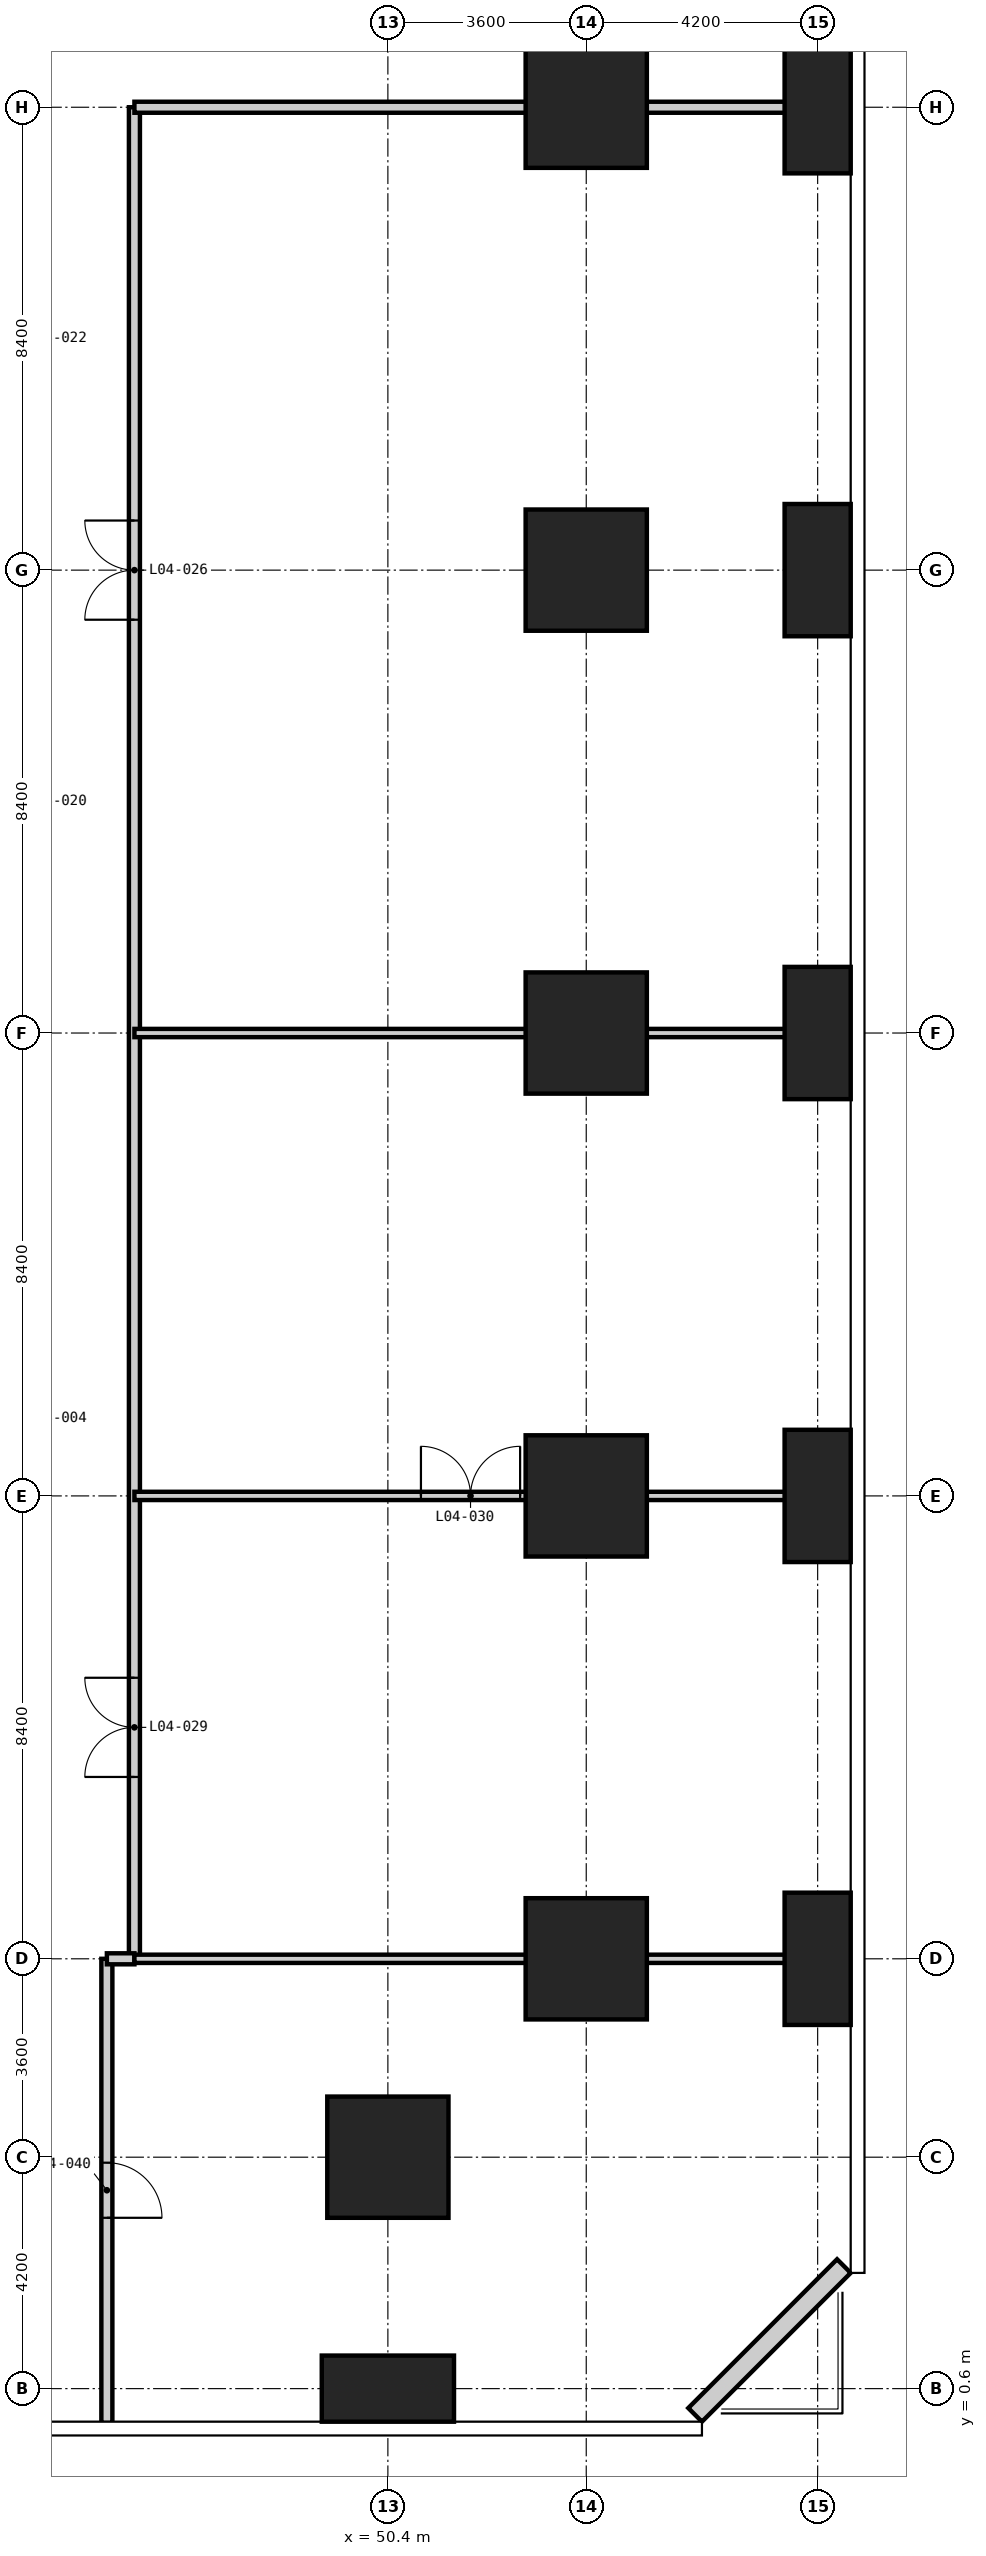
"""IFC4 building model, lengths in metres.
Left out: names, types, materials, properties, quantities, classifications, styles, units other than length and angle.
Written with IfcOpenShell. Run it as: python <this file> out.ifc"""

import sys

from ifc_helpers import new_model, si_unit, direction, frame, frame_2d, origin, origin_2d, place, context, subcontext, project, spatial, rectangle, extrude, element, fill, save


model = new_model("IFC4")
c1 = context("Model", 3, precision=1e-05, world=origin(), true_north=direction((0.0, 1.0)))
c2 = subcontext(c1, "Body", "Model", "MODEL_VIEW")
j1 = project(units=[si_unit("LENGTHUNIT", "METRE"), si_unit("PLANEANGLEUNIT", "RADIAN")], contexts=[c1])
p1 = place(None, origin())
s1 = spatial("IfcSite", under=j1, at=p1, CompositionType="ELEMENT")
p2 = place(p1, origin())
s2 = spatial("IfcBuilding", under=s1, at=p2, CompositionType="ELEMENT")
p3 = place(p2, frame((0.0, 0.0, 22.0)))
s3 = spatial("IfcBuildingStorey", under=s2, at=p3, CompositionType="ELEMENT", Elevation=22.0)
p4 = place(p3, frame((50.4, 0.6, -0.35), z_axis=(0.0, 0.0, 1.0), x_axis=(1.0, 0.0, 0.0)))
e1 = element("IfcColumn", 1, at=p4, inside=s3, PredefinedType="COLUMN", context=c2, shape_type="SweptSolid", body=[
    extrude(rectangle(XDim=2.4, YDim=1.2, at=origin_2d()), origin(), (0.0, 0.0, 1.0), 5.0),
])
for number, where, z_axis, x_axis in (
    (2, (50.4, 4.8, -0.35), (0.0, 0.0, 1.0), (1.0, 0.0, 0.0)),
    (3, (54.0, 8.4, -0.35), (0.0, 0.0, 1.0), (1.0, 0.0, 0.0)),
    (4, (54.0, 16.8, -0.35), (0.0, 0.0, 1.0), (1.0, 0.0, 0.0)),
    (5, (54.0, 25.2, -0.35), (0.0, 0.0, 1.0), (1.0, 0.0, 0.0)),
    (6, (54.0, 33.6, -0.35), (0.0, 0.0, 1.0), (1.0, 0.0, 0.0)),
    (7, (54.0, 42.0, -0.35), (0.0, 0.0, 1.0), (1.0, 0.0, 0.0)),
):
    element("IfcColumn", number, at=place(p3, frame(where, z_axis=z_axis, x_axis=x_axis)), inside=s3, PredefinedType="COLUMN", context=c2, shape_type="SweptSolid", body=[
        extrude(rectangle(XDim=2.2, YDim=2.2, at=origin_2d()), origin(), (0.0, 0.0, 1.0), 5.0),
    ])
for number, where, z_axis, x_axis in (
    (8, (58.2, 8.4, -0.35), (0.0, 0.0, 1.0), (1.0, 0.0, 0.0)),
    (9, (58.2, 16.8, -0.35), (0.0, 0.0, 1.0), (1.0, 0.0, 0.0)),
    (10, (58.2, 25.2, -0.35), (0.0, 0.0, 1.0), (1.0, 0.0, 0.0)),
    (11, (58.2, 33.6, -0.35), (0.0, 0.0, 1.0), (1.0, 0.0, 0.0)),
    (12, (58.2, 42.0, -0.35), (0.0, 0.0, 1.0), (1.0, 0.0, 0.0)),
):
    element("IfcColumn", number, at=place(p3, frame(where, z_axis=z_axis, x_axis=x_axis)), inside=s3, PredefinedType="COLUMN", context=c2, shape_type="SweptSolid", body=[
        extrude(rectangle(XDim=1.2, YDim=2.4, at=origin_2d()), origin(), (0.0, 0.0, 1.0), 5.0),
    ])
p5 = place(p3, frame((55.976, 0.124, 0.0), z_axis=(0.0, 0.0, 1.0), x_axis=(0.707106781187, 0.707106781187, 0.0)))
e13 = element("IfcWall", 13, at=p5, inside=s3, PredefinedType="SOLIDWALL", context=c2, shape_type="SweptSolid", body=[
    extrude(rectangle(XDim=3.818, YDim=0.35, at=frame_2d((1.909, 0.0))), origin(), (0.0, 0.0, 1.0), 4.65),
])
p6 = place(p3, frame((45.3, -0.023, 0.0), z_axis=(0.0, 0.0, 1.0), x_axis=(0.0, 1.0, 0.0)))
e14 = element("IfcWall", 14, at=p6, inside=s3, PredefinedType="PARTITIONING", context=c2, shape_type="SweptSolid", body=[
    extrude(rectangle(XDim=8.423, YDim=0.2, at=frame_2d((4.211, 0.0))), origin(), (0.0, 0.0, 1.0), 4.65),
])
p7 = place(p6, frame((3.723, 0.0, 0.0)))
e15 = element("IfcOpeningElement", 15, at=p7, cuts=e14, PredefinedType="OPENING", context=c2, shape_type="SweptSolid", body=[
    extrude(rectangle(XDim=1.0, YDim=2.1, at=frame_2d((0.5, 1.05))), frame((0.0, 0.11, 0.0), z_axis=(0.0, -1.0, 0.0), x_axis=(1.0, 0.0, 0.0)), (0.0, 0.0, 1.0), 0.22),
])
p8 = place(p3, frame((45.8, 8.4, 0.0), z_axis=(0.0, 0.0, 1.0), x_axis=(0.0, 1.0, 0.0)))
e16 = element("IfcWall", 16, at=p8, inside=s3, PredefinedType="PARTITIONING", context=c2, shape_type="SweptSolid", body=[
    extrude(rectangle(XDim=33.6, YDim=0.2, at=frame_2d((16.8, 0.0))), origin(), (0.0, 0.0, 1.0), 4.65),
])
p9 = place(p8, frame((24.3, 0.0, 0.0)))
e17 = element("IfcOpeningElement", 17, at=p9, cuts=e16, PredefinedType="OPENING", context=c2, shape_type="SweptSolid", body=[
    extrude(rectangle(XDim=1.8, YDim=2.4, at=frame_2d((0.9, 1.2))), frame((0.0, 0.11, 0.0), z_axis=(0.0, -1.0, 0.0), x_axis=(1.0, 0.0, 0.0)), (0.0, 0.0, 1.0), 0.22),
])
p10 = place(p8, frame((3.3, 0.0, 0.0)))
e18 = element("IfcOpeningElement", 18, at=p10, cuts=e16, PredefinedType="OPENING", context=c2, shape_type="SweptSolid", body=[
    extrude(rectangle(XDim=1.8, YDim=2.4, at=frame_2d((0.9, 1.2))), frame((0.0, 0.11, 0.0), z_axis=(0.0, -1.0, 0.0), x_axis=(1.0, 0.0, 0.0)), (0.0, 0.0, 1.0), 0.22),
])
p11 = place(p3, frame((45.3, 8.4, 0.0), z_axis=(0.0, 0.0, 1.0), x_axis=(1.0, 0.0, 0.0)))
e19 = element("IfcWall", 19, at=p11, inside=s3, PredefinedType="PARTITIONING", context=c2, shape_type="SweptSolid", body=[
    extrude(rectangle(XDim=0.5, YDim=0.2, at=frame_2d((0.25, 0.0))), origin(), (0.0, 0.0, 1.0), 4.65),
])
p12 = place(p3, frame((45.8, 42.0, 0.0), z_axis=(0.0, 0.0, 1.0), x_axis=(1.0, 0.0, 0.0)))
e20 = element("IfcWall", 20, at=p12, inside=s3, PredefinedType="PARTITIONING", context=c2, shape_type="SweptSolid", body=[
    extrude(rectangle(XDim=13.023, YDim=0.2, at=frame_2d((6.511, 0.0))), origin(), (0.0, 0.0, 1.0), 4.65),
])
p13 = place(p3, frame((45.8, 8.4, 0.0), z_axis=(0.0, 0.0, 1.0), x_axis=(1.0, 0.0, 0.0)))
e21 = element("IfcWall", 21, at=p13, inside=s3, PredefinedType="PARTITIONING", context=c2, shape_type="SweptSolid", body=[
    extrude(rectangle(XDim=13.023, YDim=0.15, at=frame_2d((6.511, 0.0))), origin(), (0.0, 0.0, 1.0), 4.65),
])
p14 = place(p3, frame((45.8, 16.8, 0.0), z_axis=(0.0, 0.0, 1.0), x_axis=(1.0, 0.0, 0.0)))
e22 = element("IfcWall", 22, at=p14, inside=s3, PredefinedType="PARTITIONING", context=c2, shape_type="SweptSolid", body=[
    extrude(rectangle(XDim=13.023, YDim=0.15, at=frame_2d((6.511, 0.0))), origin(), (0.0, 0.0, 1.0), 4.65),
])
p15 = place(p14, frame((5.2, 0.0, 0.0)))
e23 = element("IfcOpeningElement", 23, at=p15, cuts=e22, PredefinedType="OPENING", context=c2, shape_type="SweptSolid", body=[
    extrude(rectangle(XDim=1.8, YDim=2.4, at=frame_2d((0.9, 1.2))), frame((0.0, 0.085, 0.0), z_axis=(0.0, -1.0, 0.0), x_axis=(1.0, 0.0, 0.0)), (0.0, 0.0, 1.0), 0.17),
])
p16 = place(p3, frame((45.8, 25.2, 0.0), z_axis=(0.0, 0.0, 1.0), x_axis=(1.0, 0.0, 0.0)))
e24 = element("IfcWall", 24, at=p16, inside=s3, PredefinedType="PARTITIONING", context=c2, shape_type="SweptSolid", body=[
    extrude(rectangle(XDim=13.023, YDim=0.15, at=frame_2d((6.511, 0.0))), origin(), (0.0, 0.0, 1.0), 4.65),
])
p17 = place(p9, origin())
e25 = element("IfcDoor", 25, at=p17, inside=s3, OperationType="DOUBLE_DOOR_DOUBLE_SWING", PredefinedType="DOOR", context=c2, shape_type="SweptSolid", body=[
    extrude(rectangle(XDim=1.8, YDim=2.4, at=frame_2d((0.9, 1.2))), frame((0.0, 0.025, 0.0), z_axis=(0.0, -1.0, 0.0), x_axis=(1.0, 0.0, 0.0)), (0.0, 0.0, 1.0), 0.05),
])
fill(e17, e25)
p18 = place(p10, origin())
e26 = element("IfcDoor", 26, at=p18, inside=s3, OperationType="DOUBLE_DOOR_DOUBLE_SWING", PredefinedType="DOOR", context=c2, shape_type="SweptSolid", body=[
    extrude(rectangle(XDim=1.8, YDim=2.4, at=frame_2d((0.9, 1.2))), frame((0.0, 0.025, 0.0), z_axis=(0.0, -1.0, 0.0), x_axis=(1.0, 0.0, 0.0)), (0.0, 0.0, 1.0), 0.05),
])
fill(e18, e26)
p19 = place(p15, origin())
e27 = element("IfcDoor", 27, at=p19, inside=s3, OperationType="DOUBLE_DOOR_DOUBLE_SWING", PredefinedType="DOOR", context=c2, shape_type="SweptSolid", body=[
    extrude(rectangle(XDim=1.8, YDim=2.4, at=frame_2d((0.9, 1.2))), frame((0.0, 0.025, 0.0), z_axis=(0.0, -1.0, 0.0), x_axis=(1.0, 0.0, 0.0)), (0.0, 0.0, 1.0), 0.05),
])
fill(e23, e27)
p20 = place(p7, frame((1.0, 0.0, 0.0), z_axis=(0.0, 0.0, 1.0), x_axis=(-1.0, 0.0, 0.0)))
e28 = element("IfcDoor", 28, at=p20, inside=s3, OperationType="SINGLE_SWING_RIGHT", PredefinedType="DOOR", context=c2, shape_type="SweptSolid", body=[
    extrude(rectangle(XDim=1.0, YDim=2.1, at=frame_2d((0.5, 1.05))), frame((0.0, 0.025, 0.0), z_axis=(0.0, -1.0, 0.0), x_axis=(1.0, 0.0, 0.0)), (0.0, 0.0, 1.0), 0.05),
])
fill(e15, e28)
save(model, sys.argv[1])
